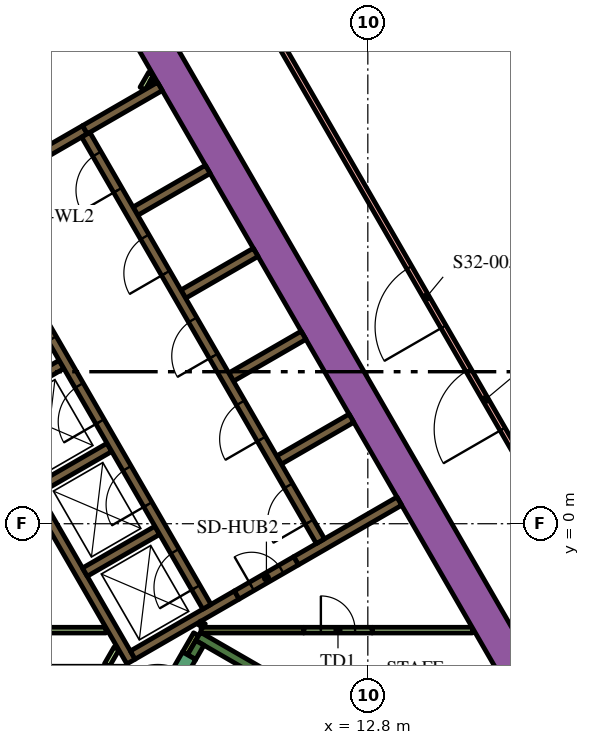
"""IFC4 building model, lengths in metres.
Left out: names, types, materials, properties, quantities, classifications, styles, units other than length and angle.
Written with IfcOpenShell. Run it as: python <this file> out.ifc"""

import sys

from ifc_helpers import new_model, si_unit, direction, frame, frame_2d, origin, place, context, subcontext, project, spatial, polyline, rectangle, outline, extrude, element, fill, save


model = new_model("IFC4")
c1 = context("Model", 3, precision=1e-05, world=origin(), true_north=direction((0.0, 1.0)))
c2 = subcontext(c1, "Body", "Model", "MODEL_VIEW")
j1 = project(units=[si_unit("LENGTHUNIT", "METRE"), si_unit("PLANEANGLEUNIT", "RADIAN")], contexts=[c1])
p1 = place(None, origin())
s1 = spatial("IfcSite", under=j1, at=p1, CompositionType="ELEMENT")
p2 = place(p1, origin())
s2 = spatial("IfcBuilding", under=s1, at=p2, CompositionType="ELEMENT")
p3 = place(p2, frame((0.0, 0.0, 134.4)))
s3 = spatial("IfcBuildingStorey", under=s2, at=p3, CompositionType="ELEMENT", Elevation=134.4)
p4 = place(p3, frame((6.776, 13.364, 0.0), z_axis=(0.0, 0.0, 1.0), x_axis=(0.500004177138, -0.8660229921, 0.0)))
e1 = element("IfcWall", 1, at=p4, inside=s3, PredefinedType="SOLIDWALL", context=c2, shape_type="SweptSolid", body=[
    extrude(rectangle(XDim=20.204, YDim=0.9, at=frame_2d((10.102, 0.0))), origin(), (0.0, 0.0, 1.0), 7.2),
])
p5 = place(p3, frame((8.334, -2.964, 0.0), z_axis=(0.0, 0.0, 1.0), x_axis=(0.866016039709, -0.500016218704, 0.0)))
e2 = element("IfcWall", 2, at=p5, inside=s3, PredefinedType="SOLIDWALL", context=c2, shape_type="SweptSolid", body=[
    extrude(rectangle(XDim=7.05, YDim=0.25, at=frame_2d((3.525, 0.0))), origin(), (0.0, 0.0, 1.0), 7.2),
])
p6 = place(p3, frame((8.163, -3.511, 0.0), z_axis=(0.0, 0.0, 1.0), x_axis=(0.500127794843, 0.865951608824, 0.0)))
e3 = element("IfcWall", 3, at=p6, inside=s3, PredefinedType="SOLIDWALL", context=c2, shape_type="SweptSolid", body=[
    extrude(rectangle(XDim=0.435, YDim=0.25, at=frame_2d((0.217, 0.0))), origin(), (0.0, 0.0, 1.0), 7.2),
])
p7 = place(p3, origin())
e4 = element("IfcWall", 4, at=p7, inside=s3, PredefinedType="SOLIDWALL", context=c2, shape_type="SweptSolid", body=[
    extrude(outline(polyline([(0.335, 6.925), (0.335, 6.925), (0.335, 7.075), (0.335, 7.075), (0.335, 7.075), (0.245, 7.075), (0.035, 7.439), (0.252, 7.564), (0.377, 7.348), (1.512, 5.382), (1.637, 5.165), (2.221, 4.153), (2.771, 3.199), (2.896, 2.983), (3.138, 2.564), (4.031, 1.017), (4.156, 0.801), (5.292, -1.165), (5.417, -1.382), (6.073, -2.519), (6.552, -3.348), (6.677, -3.564), (6.46, -3.689), (0.332, 6.925), (0.335, 6.925), (0.335, 6.925)])), origin(), (0.0, 0.0, 1.0), 7.2),
])
p8 = place(p3, frame((4.358, 9.791, 0.0), z_axis=(0.0, 0.0, 1.0), x_axis=(0.866079547155, 0.499906209203, 0.0)))
e5 = element("IfcWall", 5, at=p8, inside=s3, PredefinedType="SOLIDWALL", context=c2, shape_type="SweptSolid", body=[
    extrude(rectangle(XDim=1.15, YDim=0.25, at=frame_2d((0.575, 0.0))), origin(), (0.0, 0.0, 1.0), 7.2),
])
p9 = place(p3, frame((5.356, 10.367, 0.0), z_axis=(0.0, 0.0, 1.0), x_axis=(0.865978535641, 0.50008116922, 0.0)))
e6 = element("IfcWall", 6, at=p9, inside=s3, PredefinedType="SOLIDWALL", context=c2, shape_type="SweptSolid", body=[
    extrude(rectangle(XDim=2.278, YDim=0.25, at=frame_2d((1.139, 0.0))), origin(), (0.0, 0.0, 1.0), 7.2),
])
for number, where, z_axis, x_axis in (
    (7, (2.834, 3.091, 0.0), (0.0, 0.0, 1.0), (0.866, 0.5, 0.0)),
    (8, (4.094, 0.909, 0.0), (0.0, 0.0, 1.0), (0.866, 0.5, 0.0)),
    (9, (5.354, -1.274, 0.0), (0.0, 0.0, 1.0), (0.866, 0.5, 0.0)),
):
    element("IfcWall", number, at=place(p3, frame(where, z_axis=z_axis, x_axis=x_axis)), inside=s3, PredefinedType="SOLIDWALL", context=c2, shape_type="SweptSolid", body=[
        extrude(rectangle(XDim=2.2, YDim=0.25, at=frame_2d((1.1, 0.0))), origin(), (0.0, 0.0, 1.0), 7.2),
    ])
p10 = place(p3, frame((9.352, -1.875, 0.0), z_axis=(0.0, 0.0, 1.0), x_axis=(-0.866024844342, -0.500000968981, 0.0)))
e10 = element("IfcWall", 10, at=p10, inside=s3, PredefinedType="SOLIDWALL", context=c2, shape_type="SweptSolid", body=[
    extrude(rectangle(XDim=3.162, YDim=0.25, at=frame_2d((1.581, 0.0))), origin(), (0.0, 0.0, 1.0), 7.2),
])
for number, where, z_axis, x_axis in (
    (11, (6.684, 8.224, 0.0), (0.0, 0.0, 1.0), (0.866, 0.5, 0.0)),
    (12, (7.944, 6.041, 0.0), (0.0, 0.0, 1.0), (0.866, 0.5, 0.0)),
    (13, (9.204, 3.859, 0.0), (0.0, 0.0, 1.0), (0.866, 0.5, 0.0)),
):
    element("IfcWall", number, at=place(p3, frame(where, z_axis=z_axis, x_axis=x_axis)), inside=s3, PredefinedType="SOLIDWALL", context=c2, shape_type="SweptSolid", body=[
        extrude(rectangle(XDim=2.2, YDim=0.25, at=frame_2d((1.1, 0.0))), origin(), (0.0, 0.0, 1.0), 7.2),
    ])
p11 = place(p3, frame((10.911, -0.975, 0.0), z_axis=(0.0, 0.0, 1.0), x_axis=(0.866046979468, 0.499962627957, 0.0)))
e14 = element("IfcWall", 14, at=p11, inside=s3, PredefinedType="SOLIDWALL", context=c2, shape_type="SweptSolid", body=[
    extrude(rectangle(XDim=3.138, YDim=0.25, at=frame_2d((1.569, 0.0))), origin(), (0.0, 0.0, 1.0), 7.2),
])
p12 = place(p3, frame((10.464, 1.677, 0.0), z_axis=(0.0, 0.0, 1.0), x_axis=(0.86605622881, 0.499946605688, 0.0)))
e15 = element("IfcWall", 15, at=p12, inside=s3, PredefinedType="SOLIDWALL", context=c2, shape_type="SweptSolid", body=[
    extrude(rectangle(XDim=2.2, YDim=0.25, at=frame_2d((1.1, 0.0))), origin(), (0.0, 0.0, 1.0), 7.2),
])
p13 = place(p3, frame((5.936, -3.718, 0.0), z_axis=(0.0, 0.0, 1.0), x_axis=(0.499890179513, 0.866088799389, 0.0)))
e16 = element("IfcWall", 16, at=p13, inside=s3, PredefinedType="PARTITIONING", context=c2, shape_type="SweptSolid", body=[
    extrude(rectangle(XDim=0.504, YDim=0.15, at=frame_2d((0.252, 0.0))), origin(), (0.0, 0.0, 1.0), 6.15),
])
p14 = place(p3, frame((8.412, -2.8, 0.0), z_axis=(0.0, 0.0, 1.0), x_axis=(1.0, 0.0, 0.0)))
e17 = element("IfcWall", 17, at=p14, inside=s3, PredefinedType="PARTITIONING", context=c2, shape_type="SweptSolid", body=[
    extrude(rectangle(XDim=2.702, YDim=0.15, at=frame_2d((1.351, 0.0))), origin(), (0.0, 0.0, 1.0), 7.2),
])
p15 = place(p3, frame((8.459, -2.599, 0.0), z_axis=(0.0, 0.0, 1.0), x_axis=(-0.501919277433, -0.864914469148, 0.0)))
e18 = element("IfcWall", 18, at=p15, inside=s3, PredefinedType="PARTITIONING", context=c2, shape_type="SweptSolid", body=[
    extrude(rectangle(XDim=0.109, YDim=0.15, at=frame_2d((0.054, 0.0))), origin(), (0.0, 0.0, 1.0), 7.2),
])
p16 = place(p3, frame((8.281, -2.907, 0.0), z_axis=(0.0, 0.0, 1.0), x_axis=(-0.500193841991, -0.86591346013, 0.0)))
e19 = element("IfcWall", 19, at=p16, inside=s3, PredefinedType="PARTITIONING", context=c2, shape_type="SweptSolid", body=[
    extrude(rectangle(XDim=0.583, YDim=0.15, at=frame_2d((0.292, 0.0))), origin(), (0.0, 0.0, 1.0), 7.2),
])
p17 = place(p3, frame((3.238, -2.8, 0.0), z_axis=(0.0, 0.0, 1.0), x_axis=(1.0, 0.0, 0.0)))
e20 = element("IfcWall", 20, at=p17, inside=s3, PredefinedType="PARTITIONING", context=c2, shape_type="SweptSolid", body=[
    extrude(rectangle(XDim=2.672, YDim=0.15, at=frame_2d((1.336, 0.0))), origin(), (0.0, 0.0, 1.0), 6.15),
])
p18 = place(p3, frame((12.915, -2.8, 0.0), z_axis=(0.0, 0.0, 1.0), x_axis=(1.0, 0.0, 0.0)))
e21 = element("IfcWall", 21, at=p18, inside=s3, PredefinedType="PARTITIONING", context=c2, shape_type="SweptSolid", body=[
    extrude(rectangle(XDim=2.637, YDim=0.15, at=frame_2d((1.318, 0.0))), origin(), (0.0, 0.0, 1.0), 6.15),
])
p19 = place(p3, frame((6.872, 11.45, 0.0), z_axis=(0.0, 0.0, 1.0), x_axis=(0.499846793097, 0.866113839764, 0.0)))
e22 = element("IfcWall", 22, at=p19, inside=s3, PredefinedType="PARTITIONING", context=c2, shape_type="SweptSolid", body=[
    extrude(rectangle(XDim=0.453, YDim=0.15, at=frame_2d((0.227, 0.0))), origin(), (0.0, 0.0, 1.0), 6.15),
])
p20 = place(p3, frame((7.131, 11.6, 0.0), z_axis=(0.0, 0.0, 1.0), x_axis=(0.498600033135, 0.866832167699, 0.0)))
e23 = element("IfcWall", 23, at=p20, inside=s3, PredefinedType="PARTITIONING", context=c2, shape_type="SweptSolid", body=[
    extrude(rectangle(XDim=0.107, YDim=0.15, at=frame_2d((0.053, 0.0))), origin(), (0.0, 0.0, 1.0), 6.15),
])
p21 = place(p3, frame((11.553, -0.46, 0.0), z_axis=(0.0, 0.0, 1.0), x_axis=(-0.500006514828, 0.866021642414, 0.0)))
e24 = element("IfcWall", 24, at=p21, inside=s3, PredefinedType="SOLIDWALL", context=c2, shape_type="SweptSolid", body=[
    extrude(rectangle(XDim=12.35, YDim=0.25, at=frame_2d((6.175, 0.0))), origin(), (0.0, 0.0, 1.0), 7.2),
])
p22 = place(p21, frame((0.585, 0.0, 0.0)))
e25 = element("IfcOpeningElement", 25, at=p22, cuts=e24, PredefinedType="OPENING", context=c2, shape_type="SweptSolid", body=[
    extrude(rectangle(XDim=1.1, YDim=2.1, at=frame_2d((0.55, 1.05))), frame((0.0, 0.135, 0.0), z_axis=(0.0, -1.0, 0.0), x_axis=(1.0, 0.0, 0.0)), (0.0, 0.0, 1.0), 0.27),
])
p23 = place(p21, frame((3.105, 0.0, 0.0)))
e26 = element("IfcOpeningElement", 26, at=p23, cuts=e24, PredefinedType="OPENING", context=c2, shape_type="SweptSolid", body=[
    extrude(rectangle(XDim=1.1, YDim=2.1, at=frame_2d((0.55, 1.05))), frame((0.0, 0.135, 0.0), z_axis=(0.0, -1.0, 0.0), x_axis=(1.0, 0.0, 0.0)), (0.0, 0.0, 1.0), 0.27),
])
p24 = place(p21, frame((5.625, 0.0, 0.0)))
e27 = element("IfcOpeningElement", 27, at=p24, cuts=e24, PredefinedType="OPENING", context=c2, shape_type="SweptSolid", body=[
    extrude(rectangle(XDim=1.1, YDim=2.1, at=frame_2d((0.55, 1.05))), frame((0.0, 0.135, 0.0), z_axis=(0.0, -1.0, 0.0), x_axis=(1.0, 0.0, 0.0)), (0.0, 0.0, 1.0), 0.27),
])
p25 = place(p21, frame((8.145, 0.0, 0.0)))
e28 = element("IfcOpeningElement", 28, at=p25, cuts=e24, PredefinedType="OPENING", context=c2, shape_type="SweptSolid", body=[
    extrude(rectangle(XDim=1.1, YDim=2.1, at=frame_2d((0.55, 1.05))), frame((0.0, 0.135, 0.0), z_axis=(0.0, -1.0, 0.0), x_axis=(1.0, 0.0, 0.0)), (0.0, 0.0, 1.0), 0.27),
])
p26 = place(p21, frame((10.665, 0.0, 0.0)))
e29 = element("IfcOpeningElement", 29, at=p26, cuts=e24, PredefinedType="OPENING", context=c2, shape_type="SweptSolid", body=[
    extrude(rectangle(XDim=1.1, YDim=2.1, at=frame_2d((0.55, 1.05))), frame((0.0, 0.135, 0.0), z_axis=(0.0, -1.0, 0.0), x_axis=(1.0, 0.0, 0.0)), (0.0, 0.0, 1.0), 0.27),
])
p27 = place(p3, frame((8.565, -2.185, 0.0), z_axis=(0.0, 0.0, 1.0), x_axis=(-0.499997954832, 0.866026584559, 0.0)))
e30 = element("IfcWall", 30, at=p27, inside=s3, PredefinedType="SOLIDWALL", context=c2, shape_type="SweptSolid", body=[
    extrude(rectangle(XDim=12.35, YDim=0.25, at=frame_2d((6.175, 0.0))), origin(), (0.0, 0.0, 1.0), 7.2),
])
p28 = place(p27, frame((0.585, 0.0, 0.0)))
e31 = element("IfcOpeningElement", 31, at=p28, cuts=e30, PredefinedType="OPENING", context=c2, shape_type="SweptSolid", body=[
    extrude(rectangle(XDim=1.1, YDim=2.1, at=frame_2d((0.55, 1.05))), frame((0.0, 0.135, 0.0), z_axis=(0.0, -1.0, 0.0), x_axis=(1.0, 0.0, 0.0)), (0.0, 0.0, 1.0), 0.27),
])
p29 = place(p27, frame((3.105, 0.0, 0.0)))
e32 = element("IfcOpeningElement", 32, at=p29, cuts=e30, PredefinedType="OPENING", context=c2, shape_type="SweptSolid", body=[
    extrude(rectangle(XDim=1.1, YDim=2.1, at=frame_2d((0.55, 1.05))), frame((0.0, 0.135, 0.0), z_axis=(0.0, -1.0, 0.0), x_axis=(1.0, 0.0, 0.0)), (0.0, 0.0, 1.0), 0.27),
])
p30 = place(p27, frame((5.625, 0.0, 0.0)))
e33 = element("IfcOpeningElement", 33, at=p30, cuts=e30, PredefinedType="OPENING", context=c2, shape_type="SweptSolid", body=[
    extrude(rectangle(XDim=1.1, YDim=2.1, at=frame_2d((0.55, 1.05))), frame((0.0, 0.135, 0.0), z_axis=(0.0, -1.0, 0.0), x_axis=(1.0, 0.0, 0.0)), (0.0, 0.0, 1.0), 0.27),
])
p31 = place(p27, frame((8.145, 0.0, 0.0)))
e34 = element("IfcOpeningElement", 34, at=p31, cuts=e30, PredefinedType="OPENING", context=c2, shape_type="SweptSolid", body=[
    extrude(rectangle(XDim=1.1, YDim=2.1, at=frame_2d((0.55, 1.05))), frame((0.0, 0.135, 0.0), z_axis=(0.0, -1.0, 0.0), x_axis=(1.0, 0.0, 0.0)), (0.0, 0.0, 1.0), 0.27),
])
p32 = place(p27, frame((10.665, 0.0, 0.0)))
e35 = element("IfcOpeningElement", 35, at=p32, cuts=e30, PredefinedType="OPENING", context=c2, shape_type="SweptSolid", body=[
    extrude(rectangle(XDim=1.1, YDim=2.1, at=frame_2d((0.55, 1.05))), frame((0.0, 0.135, 0.0), z_axis=(0.0, -1.0, 0.0), x_axis=(1.0, 0.0, 0.0)), (0.0, 0.0, 1.0), 0.27),
])
p33 = place(p3, frame((7.048, -5.292, 0.0), z_axis=(0.0, 0.0, 1.0), x_axis=(0.49994051562, 0.866059744384, 0.0)))
e36 = element("IfcWall", 36, at=p33, inside=s3, PredefinedType="SOLIDWALL", context=c2, shape_type="SweptSolid", body=[
    extrude(rectangle(XDim=2.1, YDim=0.4, at=frame_2d((1.05, 0.0))), origin(), (0.0, 0.0, 1.0), 7.2),
])
p34 = place(p33, frame((0.45, 0.0, 0.0)))
e37 = element("IfcOpeningElement", 37, at=p34, cuts=e36, PredefinedType="OPENING", context=c2, shape_type="SweptSolid", body=[
    extrude(rectangle(XDim=1.2, YDim=2.1, at=frame_2d((0.6, 1.05))), frame((0.0, 0.21, 0.0), z_axis=(0.0, -1.0, 0.0), x_axis=(1.0, 0.0, 0.0)), (0.0, 0.0, 1.0), 0.42),
])
p35 = place(p3, frame((9.352, -1.875, 0.0), z_axis=(0.0, 0.0, 1.0), x_axis=(0.865989075817, 0.500062916607, 0.0)))
e38 = element("IfcWall", 38, at=p35, inside=s3, PredefinedType="SOLIDWALL", context=c2, shape_type="SweptSolid", body=[
    extrude(rectangle(XDim=1.8, YDim=0.25, at=frame_2d((0.9, 0.0))), origin(), (0.0, 0.0, 1.0), 7.2),
])
p36 = place(p35, frame((0.45, 0.0, 0.0)))
e39 = element("IfcOpeningElement", 39, at=p36, cuts=e38, PredefinedType="OPENING", context=c2, shape_type="SweptSolid", body=[
    extrude(rectangle(XDim=0.9, YDim=2.1, at=frame_2d((0.45, 1.05))), frame((0.0, 0.135, 0.0), z_axis=(0.0, -1.0, 0.0), x_axis=(1.0, 0.0, 0.0)), (0.0, 0.0, 1.0), 0.27),
])
p37 = place(p3, frame((11.115, -2.8, 0.0), z_axis=(0.0, 0.0, 1.0), x_axis=(1.0, 0.0, 0.0)))
e40 = element("IfcWall", 40, at=p37, inside=s3, PredefinedType="PARTITIONING", context=c2, shape_type="SweptSolid", body=[
    extrude(rectangle(XDim=1.8, YDim=0.15, at=frame_2d((0.9, 0.0))), origin(), (0.0, 0.0, 1.0), 6.15),
])
p38 = place(p37, frame((0.45, 0.0, 0.0)))
e41 = element("IfcOpeningElement", 41, at=p38, cuts=e40, PredefinedType="OPENING", context=c2, shape_type="SweptSolid", body=[
    extrude(rectangle(XDim=0.9, YDim=2.1, at=frame_2d((0.45, 1.05))), frame((0.0, 0.085, 0.0), z_axis=(0.0, -1.0, 0.0), x_axis=(1.0, 0.0, 0.0)), (0.0, 0.0, 1.0), 0.17),
])
p39 = place(p3, frame((20.034, -3.9, 0.0), z_axis=(0.0, 0.0, 1.0), x_axis=(-0.500006098403, 0.866021882841, 0.0)))
e42 = element("IfcWall", 42, at=p39, inside=s3, PredefinedType="PARTITIONING", context=c2, shape_type="SweptSolid", body=[
    extrude(rectangle(XDim=22.774, YDim=0.15, at=frame_2d((11.387, 0.0))), origin(), (0.0, 0.0, 1.0), 6.15),
])
p40 = place(p39, frame((10.487, 0.0, 0.0)))
e43 = element("IfcOpeningElement", 43, at=p40, cuts=e42, PredefinedType="OPENING", context=c2, shape_type="SweptSolid", body=[
    extrude(rectangle(XDim=1.8, YDim=2.1, at=frame_2d((0.9, 1.05))), frame((0.0, 0.085, 0.0), z_axis=(0.0, -1.0, 0.0), x_axis=(1.0, 0.0, 0.0)), (0.0, 0.0, 1.0), 0.17),
])
p41 = place(p39, frame((7.377, 0.0, 0.0)))
e44 = element("IfcOpeningElement", 44, at=p41, cuts=e42, PredefinedType="OPENING", context=c2, shape_type="SweptSolid", body=[
    extrude(rectangle(XDim=1.8, YDim=2.1, at=frame_2d((0.9, 1.05))), frame((0.0, 0.085, 0.0), z_axis=(0.0, -1.0, 0.0), x_axis=(1.0, 0.0, 0.0)), (0.0, 0.0, 1.0), 0.17),
])
p42 = place(p22, origin())
e45 = element("IfcDoor", 45, at=p42, inside=s3, OperationType="DOUBLE_DOOR_SLIDING", PredefinedType="DOOR", context=c2, shape_type="SweptSolid", body=[
    extrude(rectangle(XDim=1.1, YDim=2.1, at=frame_2d((0.55, 1.05))), frame((0.0, 0.025, 0.0), z_axis=(0.0, -1.0, 0.0), x_axis=(1.0, 0.0, 0.0)), (0.0, 0.0, 1.0), 0.05),
])
fill(e25, e45)
p43 = place(p23, origin())
e46 = element("IfcDoor", 46, at=p43, inside=s3, OperationType="DOUBLE_DOOR_SLIDING", PredefinedType="DOOR", context=c2, shape_type="SweptSolid", body=[
    extrude(rectangle(XDim=1.1, YDim=2.1, at=frame_2d((0.55, 1.05))), frame((0.0, 0.025, 0.0), z_axis=(0.0, -1.0, 0.0), x_axis=(1.0, 0.0, 0.0)), (0.0, 0.0, 1.0), 0.05),
])
fill(e26, e46)
p44 = place(p24, origin())
e47 = element("IfcDoor", 47, at=p44, inside=s3, OperationType="DOUBLE_DOOR_SLIDING", PredefinedType="DOOR", context=c2, shape_type="SweptSolid", body=[
    extrude(rectangle(XDim=1.1, YDim=2.1, at=frame_2d((0.55, 1.05))), frame((0.0, 0.025, 0.0), z_axis=(0.0, -1.0, 0.0), x_axis=(1.0, 0.0, 0.0)), (0.0, 0.0, 1.0), 0.05),
])
fill(e27, e47)
p45 = place(p25, origin())
e48 = element("IfcDoor", 48, at=p45, inside=s3, OperationType="DOUBLE_DOOR_SLIDING", PredefinedType="DOOR", context=c2, shape_type="SweptSolid", body=[
    extrude(rectangle(XDim=1.1, YDim=2.1, at=frame_2d((0.55, 1.05))), frame((0.0, 0.025, 0.0), z_axis=(0.0, -1.0, 0.0), x_axis=(1.0, 0.0, 0.0)), (0.0, 0.0, 1.0), 0.05),
])
fill(e28, e48)
p46 = place(p26, origin())
e49 = element("IfcDoor", 49, at=p46, inside=s3, OperationType="DOUBLE_DOOR_SLIDING", PredefinedType="DOOR", context=c2, shape_type="SweptSolid", body=[
    extrude(rectangle(XDim=1.1, YDim=2.1, at=frame_2d((0.55, 1.05))), frame((0.0, 0.025, 0.0), z_axis=(0.0, -1.0, 0.0), x_axis=(1.0, 0.0, 0.0)), (0.0, 0.0, 1.0), 0.05),
])
fill(e29, e49)
p47 = place(p28, origin())
e50 = element("IfcDoor", 50, at=p47, inside=s3, OperationType="DOUBLE_DOOR_SLIDING", PredefinedType="DOOR", context=c2, shape_type="SweptSolid", body=[
    extrude(rectangle(XDim=1.1, YDim=2.1, at=frame_2d((0.55, 1.05))), frame((0.0, 0.025, 0.0), z_axis=(0.0, -1.0, 0.0), x_axis=(1.0, 0.0, 0.0)), (0.0, 0.0, 1.0), 0.05),
])
fill(e31, e50)
p48 = place(p29, origin())
e51 = element("IfcDoor", 51, at=p48, inside=s3, OperationType="DOUBLE_DOOR_SLIDING", PredefinedType="DOOR", context=c2, shape_type="SweptSolid", body=[
    extrude(rectangle(XDim=1.1, YDim=2.1, at=frame_2d((0.55, 1.05))), frame((0.0, 0.025, 0.0), z_axis=(0.0, -1.0, 0.0), x_axis=(1.0, 0.0, 0.0)), (0.0, 0.0, 1.0), 0.05),
])
fill(e32, e51)
p49 = place(p30, origin())
e52 = element("IfcDoor", 52, at=p49, inside=s3, OperationType="DOUBLE_DOOR_SLIDING", PredefinedType="DOOR", context=c2, shape_type="SweptSolid", body=[
    extrude(rectangle(XDim=1.1, YDim=2.1, at=frame_2d((0.55, 1.05))), frame((0.0, 0.025, 0.0), z_axis=(0.0, -1.0, 0.0), x_axis=(1.0, 0.0, 0.0)), (0.0, 0.0, 1.0), 0.05),
])
fill(e33, e52)
p50 = place(p31, origin())
e53 = element("IfcDoor", 53, at=p50, inside=s3, OperationType="DOUBLE_DOOR_SLIDING", PredefinedType="DOOR", context=c2, shape_type="SweptSolid", body=[
    extrude(rectangle(XDim=1.1, YDim=2.1, at=frame_2d((0.55, 1.05))), frame((0.0, 0.025, 0.0), z_axis=(0.0, -1.0, 0.0), x_axis=(1.0, 0.0, 0.0)), (0.0, 0.0, 1.0), 0.05),
])
fill(e34, e53)
p51 = place(p36, origin())
e54 = element("IfcDoor", 54, at=p51, inside=s3, OperationType="SINGLE_SWING_LEFT", PredefinedType="DOOR", context=c2, shape_type="SweptSolid", body=[
    extrude(rectangle(XDim=0.9, YDim=2.1, at=frame_2d((0.45, 1.05))), frame((0.0, 0.025, 0.0), z_axis=(0.0, -1.0, 0.0), x_axis=(1.0, 0.0, 0.0)), (0.0, 0.0, 1.0), 0.05),
])
fill(e39, e54)
p52 = place(p38, origin())
e55 = element("IfcDoor", 55, at=p52, inside=s3, OperationType="SINGLE_SWING_LEFT", PredefinedType="DOOR", context=c2, shape_type="SweptSolid", body=[
    extrude(rectangle(XDim=0.9, YDim=2.1, at=frame_2d((0.45, 1.05))), frame((0.0, 0.025, 0.0), z_axis=(0.0, -1.0, 0.0), x_axis=(1.0, 0.0, 0.0)), (0.0, 0.0, 1.0), 0.05),
])
fill(e41, e55)
p53 = place(p40, origin())
e56 = element("IfcDoor", 56, at=p53, inside=s3, OperationType="DOUBLE_DOOR_SINGLE_SWING", PredefinedType="DOOR", context=c2, shape_type="SweptSolid", body=[
    extrude(rectangle(XDim=1.8, YDim=2.1, at=frame_2d((0.9, 1.05))), frame((0.0, 0.025, 0.0), z_axis=(0.0, -1.0, 0.0), x_axis=(1.0, 0.0, 0.0)), (0.0, 0.0, 1.0), 0.05),
])
fill(e43, e56)
p54 = place(p41, origin())
e57 = element("IfcDoor", 57, at=p54, inside=s3, OperationType="DOUBLE_DOOR_SINGLE_SWING", PredefinedType="DOOR", context=c2, shape_type="SweptSolid", body=[
    extrude(rectangle(XDim=1.8, YDim=2.1, at=frame_2d((0.9, 1.05))), frame((0.0, 0.025, 0.0), z_axis=(0.0, -1.0, 0.0), x_axis=(1.0, 0.0, 0.0)), (0.0, 0.0, 1.0), 0.05),
])
fill(e44, e57)
save(model, sys.argv[1])
